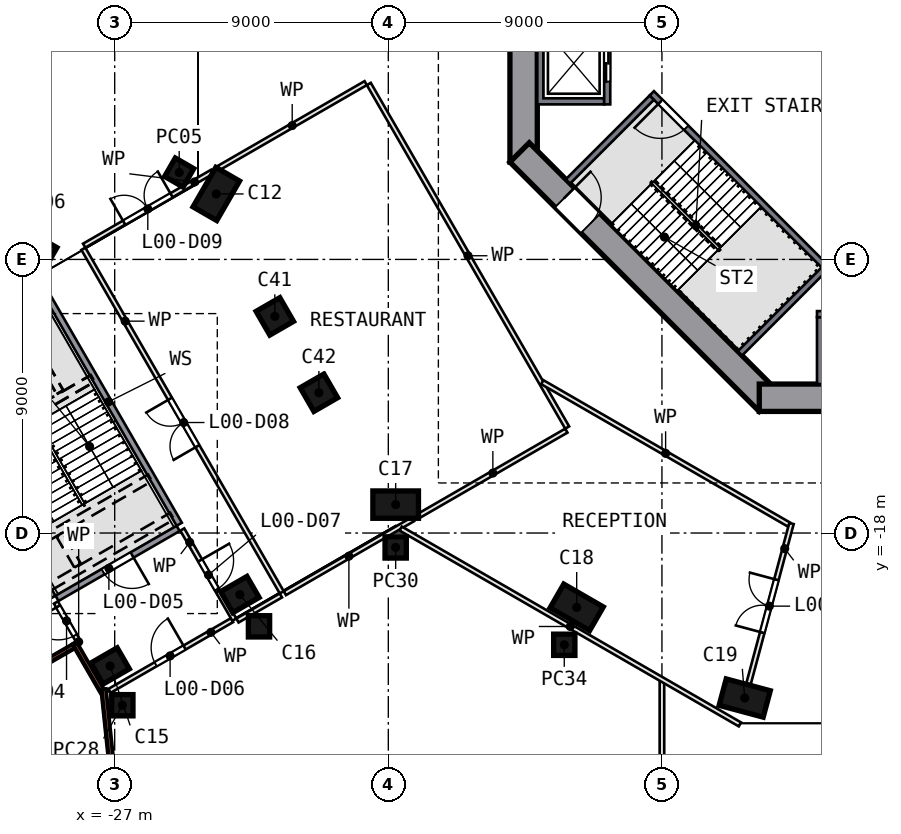
"""IFC4 building model, lengths in metres.
Left out: names, types, materials, properties, quantities, classifications, styles, units other than length and angle.
Written with IfcOpenShell. Run it as: python <this file> out.ifc"""

import sys

from ifc_helpers import new_model, si_unit, direction, frame, frame_2d, origin, origin_2d, place, context, subcontext, project, spatial, polyline, rectangle, outline, extrude, element, fill, save


model = new_model("IFC4")
c1 = context("Model", 3, precision=1e-05, world=origin(), true_north=direction((0.0, 1.0)))
c2 = subcontext(c1, "Body", "Model", "MODEL_VIEW")
j1 = project(units=[si_unit("LENGTHUNIT", "METRE"), si_unit("PLANEANGLEUNIT", "RADIAN")], contexts=[c1])
p1 = place(None, origin())
s1 = spatial("IfcSite", under=j1, at=p1, CompositionType="ELEMENT")
p2 = place(p1, origin())
s2 = spatial("IfcBuilding", under=s1, at=p2, CompositionType="ELEMENT")
p3 = place(p2, origin())
s3 = spatial("IfcBuildingStorey", under=s2, at=p3, CompositionType="ELEMENT", Elevation=0.0)
p4 = place(p3, frame((-23.658, -6.846, 0.0), z_axis=(0.0, 0.0, 1.0), x_axis=(0.5, 0.866025404, 0.0)))
e1 = element("IfcColumn", 1, at=p4, inside=s3, PredefinedType="COLUMN", context=c2, shape_type="SweptSolid", body=[
    extrude(rectangle(XDim=1.5, YDim=0.9, at=origin_2d()), origin(), (0.0, 0.0, 1.0), 7.55),
])
for number, where, z_axis, x_axis in (
    (2, (-27.151, -22.373, 0.0), (0.0, 0.0, 1.0), (0.866, 0.5, 0.0)),
    (3, (-22.883, -20.024, 0.0), (0.0, 0.0, 1.0), (0.866, 0.5, 0.0)),
):
    element("IfcColumn", number, at=place(p3, frame(where, z_axis=z_axis, x_axis=x_axis)), inside=s3, PredefinedType="COLUMN", context=c2, shape_type="SweptSolid", body=[
        extrude(rectangle(XDim=1.0, YDim=0.8, at=origin_2d()), origin(), (0.0, 0.0, 1.0), 7.55),
    ])
for number, where, z_axis, x_axis in (
    (4, (-17.758, -17.065, 0.0), (0.0, 0.0, 1.0), (-1.0, 0.0, 0.0)),
    (5, (-11.804, -20.445, 0.0), (0.0, 0.0, 1.0), (0.866, -0.5, 0.0)),
    (6, (-6.278, -23.428, 0.0), (0.0, 0.0, 1.0), (-0.966, 0.259, 0.0)),
):
    element("IfcColumn", number, at=place(p3, frame(where, z_axis=z_axis, x_axis=x_axis)), inside=s3, PredefinedType="COLUMN", context=c2, shape_type="SweptSolid", body=[
        extrude(rectangle(XDim=1.5, YDim=0.9, at=origin_2d()), origin(), (0.0, 0.0, 1.0), 7.55),
    ])
for number, where, z_axis, x_axis in (
    (7, (-21.733, -10.873, 0.0), (0.0, 0.0, 1.0), (-0.866, -0.5, 0.0)),
    (8, (-20.283, -13.385, 0.0), (0.0, 0.0, 1.0), (-0.866, -0.5, 0.0)),
):
    element("IfcColumn", number, at=place(p3, frame(where, z_axis=z_axis, x_axis=x_axis)), inside=s3, PredefinedType="COLUMN", context=c2, shape_type="SweptSolid", body=[
        extrude(rectangle(XDim=0.9, YDim=0.9, at=origin_2d()), origin(), (0.0, 0.0, 1.0), 7.55),
    ])
p5 = place(p3, frame((-13.55, 5.799, 0.0), z_axis=(0.0, 0.0, 1.0), x_axis=(0.0, -1.0, 0.0)))
e9 = element("IfcWall", 9, at=p5, inside=s3, PredefinedType="SHEAR", context=c2, shape_type="SweptSolid", body=[
    extrude(rectangle(XDim=11.598, YDim=0.9, at=frame_2d((5.799, 0.0))), origin(), (0.0, 0.0, 1.0), 8.0),
])
p6 = place(p5, frame((4.899, 0.0, 0.0)))
e10 = element("IfcOpeningElement", 10, at=p6, cuts=e9, PredefinedType="OPENING", context=c2, shape_type="SweptSolid", body=[
    extrude(rectangle(XDim=1.8, YDim=2.1, at=frame_2d((0.9, 1.05))), frame((0.0, 0.46, 0.0), z_axis=(0.0, -1.0, 0.0), x_axis=(1.0, 0.0, 0.0)), (0.0, 0.0, 1.0), 0.92),
])
p7 = place(p3, frame((-13.682, -5.481, 0.0), z_axis=(0.0, 0.0, 1.0), x_axis=(0.707106781, -0.707106781, 0.0)))
e11 = element("IfcWall", 11, at=p7, inside=s3, PredefinedType="SHEAR", context=c2, shape_type="SweptSolid", body=[
    extrude(rectangle(XDim=11.598, YDim=0.9, at=frame_2d((5.799, 0.0))), origin(), (0.0, 0.0, 1.0), 8.0),
])
p8 = place(p7, frame((2.099, 0.0, 0.0)))
e12 = element("IfcOpeningElement", 12, at=p8, cuts=e11, PredefinedType="OPENING", context=c2, shape_type="SweptSolid", body=[
    extrude(rectangle(XDim=1.2, YDim=2.1, at=frame_2d((0.6, 1.05))), frame((0.0, 0.46, 0.0), z_axis=(0.0, -1.0, 0.0), x_axis=(1.0, 0.0, 0.0)), (0.0, 0.0, 1.0), 0.92),
])
p9 = place(p3, frame((-5.799, -13.55, 0.0), z_axis=(0.0, 0.0, 1.0), x_axis=(1.0, 0.0, 0.0)))
e13 = element("IfcWall", 13, at=p9, inside=s3, PredefinedType="SHEAR", context=c2, shape_type="SweptSolid", body=[
    extrude(rectangle(XDim=11.598, YDim=0.9, at=frame_2d((5.799, 0.0))), origin(), (0.0, 0.0, 1.0), 8.0),
])
p10 = place(p9, frame((4.899, 0.0, 0.0)))
e14 = element("IfcOpeningElement", 14, at=p10, cuts=e13, PredefinedType="OPENING", context=c2, shape_type="SweptSolid", body=[
    extrude(rectangle(XDim=1.8, YDim=2.1, at=frame_2d((0.9, 1.05))), frame((0.0, 0.46, 0.0), z_axis=(0.0, -1.0, 0.0), x_axis=(1.0, 0.0, 0.0)), (0.0, 0.0, 1.0), 0.92),
])
for number, where, z_axis, x_axis in (
    (15, (-24.878, -6.142, 0.0), (0.0, 0.0, 1.0), (-0.866, 0.5, 0.0)),
    (16, (-29.378, -8.74, 0.0), (0.0, 0.0, 1.0), (-0.866, 0.5, 0.0)),
    (17, (-26.749, -23.665, 0.0), (0.0, 0.0, 1.0), (0.0, -1.0, 0.0)),
    (18, (-22.253, -21.07, 0.0), (0.0, 0.0, 1.0), (0.0, -1.0, 0.0)),
    (19, (-17.758, -18.474, 0.0), (0.0, 0.0, 1.0), (0.0, -1.0, 0.0)),
    (20, (-12.212, -21.676, 0.0), (0.0, 0.0, 1.0), (0.0, -1.0, 0.0)),
):
    element("IfcColumn", number, at=place(p3, frame(where, z_axis=z_axis, x_axis=x_axis)), inside=s3, PredefinedType="COLUMN", context=c2, shape_type="SweptSolid", body=[
        extrude(rectangle(XDim=0.7, YDim=0.7, at=origin_2d()), origin(), (0.0, 0.0, 1.0), 8.0),
    ])
p11 = place(p3, frame((-29.78, -22.54, 0.0), z_axis=(0.0, 0.0, 1.0), x_axis=(0.865989634, 0.500061949, 0.0)))
e21 = element("IfcWall", 21, at=p11, inside=s3, PredefinedType="SOLIDWALL", context=c2, shape_type="SweptSolid", body=[
    extrude(rectangle(XDim=1.66, YDim=0.14, at=frame_2d((0.83, 0.0))), origin(), (0.0, 0.0, 1.0), 7.55),
])
p12 = place(p3, frame((-28.317, -21.614, 0.0), z_axis=(0.0, 0.0, 1.0), x_axis=(0.499983248, -0.866035075, 0.0)))
e22 = element("IfcWall", 22, at=p12, inside=s3, PredefinedType="SOLIDWALL", context=c2, shape_type="SweptSolid", body=[
    extrude(rectangle(XDim=1.783, YDim=0.14, at=frame_2d((0.891, 0.0))), origin(), (0.0, 0.0, 1.0), 7.55),
])
p13 = place(p3, frame((-25.925, -36.773, 0.0), z_axis=(0.0, 0.0, 1.0), x_axis=(-0.104443805, 0.99453079, 0.0)))
e23 = element("IfcWall", 23, at=p13, inside=s3, PredefinedType="SOLIDWALL", context=c2, shape_type="SweptSolid", body=[
    extrude(rectangle(XDim=13.712, YDim=0.14, at=frame_2d((6.856, 0.0))), origin(), (0.0, 0.0, 1.0), 7.55),
])
p14 = place(p13, frame((9.383, 0.0, 0.0)))
e24 = element("IfcOpeningElement", 24, at=p14, cuts=e23, PredefinedType="OPENING", context=c2, shape_type="SweptSolid", body=[
    extrude(rectangle(XDim=1.1, YDim=2.4, at=frame_2d((0.55, 1.2))), frame((0.0, 0.08, 0.0), z_axis=(0.0, -1.0, 0.0), x_axis=(1.0, 0.0, 0.0)), (0.0, 0.0, 1.0), 0.16),
])
p15 = place(p13, frame((3.004, 0.0, 0.0)))
e25 = element("IfcOpeningElement", 25, at=p15, cuts=e23, PredefinedType="OPENING", context=c2, shape_type="SweptSolid", body=[
    extrude(rectangle(XDim=1.1, YDim=2.4, at=frame_2d((0.55, 1.2))), frame((0.0, 0.08, 0.0), z_axis=(0.0, -1.0, 0.0), x_axis=(1.0, 0.0, 0.0)), (0.0, 0.0, 1.0), 0.16),
])
p16 = place(p3, origin())
e26 = element("IfcWall", 26, at=p16, inside=s3, PredefinedType="SOLIDWALL", context=c2, shape_type="SweptSolid", body=[
    extrude(outline(polyline([(-13.1, -3.9), (-13.1, -1.2), (-10.9, -1.2), (-10.9, -1.4), (-12.9, -1.4), (-12.9, -3.7), (-10.9, -3.7), (-10.9, -3.9), (-13.1, -3.9)])), origin(), (0.0, 0.0, 1.0), 7.55),
])
p17 = place(p3, frame((-10.8, -1.2, 0.0), z_axis=(0.0, 0.0, 1.0), x_axis=(0.0, -1.0, 0.0)))
e27 = element("IfcWall", 27, at=p17, inside=s3, PredefinedType="SOLIDWALL", context=c2, shape_type="SweptSolid", body=[
    extrude(rectangle(XDim=2.7, YDim=0.2, at=frame_2d((1.35, 0.0))), origin(), (0.0, 0.0, 1.0), 7.55),
])
p18 = place(p17, frame((0.75, 0.0, 0.0)))
e28 = element("IfcOpeningElement", 28, at=p18, cuts=e27, PredefinedType="OPENING", context=c2, shape_type="SweptSolid", body=[
    extrude(rectangle(XDim=1.2, YDim=2.1, at=frame_2d((0.6, 1.05))), frame((0.0, 0.11, 0.0), z_axis=(0.0, -1.0, 0.0), x_axis=(1.0, 0.0, 0.0)), (0.0, 0.0, 1.0), 0.22),
])
p19 = place(p3, origin())
e29 = element("IfcWall", 29, at=p19, inside=s3, PredefinedType="SOLIDWALL", context=c2, shape_type="SweptSolid", body=[
    extrude(outline(polyline([(-3.9, -13.1), (-3.9, -10.9), (-3.7, -10.9), (-3.7, -12.9), (-1.4, -12.9), (-1.4, -10.9), (-1.2, -10.9), (-1.2, -13.1), (-3.9, -13.1)])), origin(), (0.0, 0.0, 1.0), 7.55),
])
p20 = place(p3, frame((-1.2, -10.8, 0.0), z_axis=(0.0, 0.0, 1.0), x_axis=(-1.0, 0.0, 0.0)))
e30 = element("IfcWall", 30, at=p20, inside=s3, PredefinedType="SOLIDWALL", context=c2, shape_type="SweptSolid", body=[
    extrude(rectangle(XDim=2.7, YDim=0.2, at=frame_2d((1.35, 0.0))), origin(), (0.0, 0.0, 1.0), 7.55),
])
p21 = place(p20, frame((0.75, 0.0, 0.0)))
e31 = element("IfcOpeningElement", 31, at=p21, cuts=e30, PredefinedType="OPENING", context=c2, shape_type="SweptSolid", body=[
    extrude(rectangle(XDim=1.2, YDim=2.1, at=frame_2d((0.6, 1.05))), frame((0.0, 0.11, 0.0), z_axis=(0.0, -1.0, 0.0), x_axis=(1.0, 0.0, 0.0)), (0.0, 0.0, 1.0), 0.22),
])
p22 = place(p3, frame((-3.535, -9.334, 0.0), z_axis=(0.0, 0.0, 1.0), x_axis=(-0.707106781, 0.707106781, 0.0)))
e32 = element("IfcWall", 32, at=p22, inside=s3, PredefinedType="SOLIDWALL", context=c2, shape_type="SweptSolid", body=[
    extrude(rectangle(XDim=8.2, YDim=0.2, at=frame_2d((4.1, 0.0))), origin(), (0.0, 0.0, 1.0), 7.55),
])
p23 = place(p22, frame((6.6, 0.0, 0.0)))
e33 = element("IfcOpeningElement", 33, at=p23, cuts=e32, PredefinedType="OPENING", context=c2, shape_type="SweptSolid", body=[
    extrude(rectangle(XDim=1.2, YDim=2.1, at=frame_2d((0.6, 1.05))), frame((0.0, 0.11, 0.0), z_axis=(0.0, -1.0, 0.0), x_axis=(1.0, 0.0, 0.0)), (0.0, 0.0, 1.0), 0.22),
])
for number, where, z_axis, x_axis in (
    (34, (-9.334, -3.677, 0.0), (0.0, 0.0, 1.0), (-0.707, -0.707, 0.0)),
    (35, (-3.677, -9.334, 0.0), (0.0, 0.0, 1.0), (-0.707, -0.707, 0.0)),
):
    element("IfcWall", number, at=place(p3, frame(where, z_axis=z_axis, x_axis=x_axis)), inside=s3, PredefinedType="SOLIDWALL", context=c2, shape_type="SweptSolid", body=[
        extrude(rectangle(XDim=3.9, YDim=0.2, at=frame_2d((1.95, 0.0))), origin(), (0.0, 0.0, 1.0), 7.55),
    ])
p24 = place(p3, frame((-32.807, -13.577, 0.0), z_axis=(0.0, 0.0, 1.0), x_axis=(0.50000534, -0.866022321, 0.0)))
e36 = element("IfcWall", 36, at=p24, inside=s3, PredefinedType="SOLIDWALL", context=c2, shape_type="SweptSolid", body=[
    extrude(rectangle(XDim=7.545, YDim=0.2, at=frame_2d((3.773, 0.0))), origin(), (0.0, 0.0, 1.0), 7.55),
])
p25 = place(p3, frame((-28.162, -21.623, 0.0), z_axis=(0.0, 0.0, 1.0), x_axis=(-0.499877454, 0.866096144, 0.0)))
e37 = element("IfcWall", 37, at=p25, inside=s3, PredefinedType="PARTITIONING", context=c2, shape_type="SweptSolid", body=[
    extrude(rectangle(XDim=1.545, YDim=0.15, at=frame_2d((0.773, 0.0))), origin(), (0.0, 0.0, 1.0), 7.55),
])
p26 = place(p25, frame((0.295, 0.0, 0.0)))
e38 = element("IfcOpeningElement", 38, at=p26, cuts=e37, PredefinedType="OPENING", context=c2, shape_type="SweptSolid", body=[
    extrude(rectangle(XDim=1.1, YDim=2.1, at=frame_2d((0.55, 1.05))), frame((0.0, 0.085, 0.0), z_axis=(0.0, -1.0, 0.0), x_axis=(1.0, 0.0, 0.0)), (0.0, 0.0, 1.0), 0.17),
])
p27 = place(p3, frame((-24.914, -17.848, 0.0), z_axis=(0.0, 0.0, 1.0), x_axis=(-0.86601677, -0.500014953, 0.0)))
e39 = element("IfcWall", 39, at=p27, inside=s3, PredefinedType="SOLIDWALL", context=c2, shape_type="SweptSolid", body=[
    extrude(rectangle(XDim=4.6, YDim=0.2, at=frame_2d((2.3, 0.0))), origin(), (0.0, 0.0, 1.0), 7.55),
])
p28 = place(p27, frame((1.75, 0.0, 0.0)))
e40 = element("IfcOpeningElement", 40, at=p28, cuts=e39, PredefinedType="OPENING", context=c2, shape_type="SweptSolid", body=[
    extrude(rectangle(XDim=1.1, YDim=2.1, at=frame_2d((0.55, 1.05))), frame((0.0, 0.11, 0.0), z_axis=(0.0, -1.0, 0.0), x_axis=(1.0, 0.0, 0.0)), (0.0, 0.0, 1.0), 0.22),
])
p29 = place(p3, frame((-27.169, -23.192, 0.0), z_axis=(0.0, 0.0, 1.0), x_axis=(0.866011597, 0.500023913, 0.0)))
e41 = element("IfcWall", 41, at=p29, inside=s3, PredefinedType="PARTITIONING", context=c2, shape_type="SweptSolid", body=[
    extrude(rectangle(XDim=4.65, YDim=0.15, at=frame_2d((2.325, 0.0))), origin(), (0.0, 0.0, 1.0), 7.55),
])
p30 = place(p29, frame((1.75, 0.0, 0.0)))
e42 = element("IfcOpeningElement", 42, at=p30, cuts=e41, PredefinedType="OPENING", context=c2, shape_type="SweptSolid", body=[
    extrude(rectangle(XDim=1.1, YDim=2.1, at=frame_2d((0.55, 1.05))), frame((0.0, 0.085, 0.0), z_axis=(0.0, -1.0, 0.0), x_axis=(1.0, 0.0, 0.0)), (0.0, 0.0, 1.0), 0.17),
])
p31 = place(p3, frame((-24.877, -17.712, 0.0), z_axis=(0.0, 0.0, 1.0), x_axis=(-0.499984537, 0.866034331, 0.0)))
e43 = element("IfcWall", 43, at=p31, inside=s3, PredefinedType="SOLIDWALL", context=c2, shape_type="SweptSolid", body=[
    extrude(rectangle(XDim=9.3, YDim=0.2, at=frame_2d((4.65, 0.0))), origin(), (0.0, 0.0, 1.0), 7.55),
])
p32 = place(p3, frame((-24.777, -17.885, 0.0), z_axis=(0.0, 0.0, 1.0), x_axis=(0.500041249, -0.866001587, 0.0)))
e44 = element("IfcWall", 44, at=p32, inside=s3, PredefinedType="PARTITIONING", context=c2, shape_type="SweptSolid", body=[
    extrude(rectangle(XDim=3.425, YDim=0.15, at=frame_2d((1.712, 0.0))), origin(), (0.0, 0.0, 1.0), 7.55),
])
p33 = place(p32, frame((1.175, 0.0, 0.0)))
e45 = element("IfcOpeningElement", 45, at=p33, cuts=e44, PredefinedType="OPENING", context=c2, shape_type="SweptSolid", body=[
    extrude(rectangle(XDim=1.1, YDim=2.1, at=frame_2d((0.55, 1.05))), frame((0.0, 0.085, 0.0), z_axis=(0.0, -1.0, 0.0), x_axis=(1.0, 0.0, 0.0)), (0.0, 0.0, 1.0), 0.17),
])
p34 = place(p3, frame((-22.962, -20.878, 0.0), z_axis=(0.0, 0.0, 1.0), x_axis=(0.866040212, 0.499974351, 0.0)))
e46 = element("IfcWall", 46, at=p34, inside=s3, PredefinedType="PARTITIONING", context=c2, shape_type="SweptSolid", body=[
    extrude(rectangle(XDim=1.65, YDim=0.15, at=frame_2d((0.825, 0.0))), origin(), (0.0, 0.0, 1.0), 7.55),
])
p35 = place(p3, frame((-21.506, -19.951, 0.0), z_axis=(0.0, 0.0, 1.0), x_axis=(-0.499998298, 0.866026387, 0.0)))
e47 = element("IfcWall", 47, at=p35, inside=s3, PredefinedType="PARTITIONING", context=c2, shape_type="SweptSolid", body=[
    extrude(rectangle(XDim=13.05, YDim=0.15, at=frame_2d((6.525, 0.0))), origin(), (0.0, 0.0, 1.0), 7.55),
])
p36 = place(p35, frame((5.55, 0.0, 0.0)))
e48 = element("IfcOpeningElement", 48, at=p36, cuts=e47, PredefinedType="OPENING", context=c2, shape_type="SweptSolid", body=[
    extrude(rectangle(XDim=1.8, YDim=2.1, at=frame_2d((0.9, 1.05))), frame((0.0, 0.085, 0.0), z_axis=(0.0, -1.0, 0.0), x_axis=(1.0, 0.0, 0.0)), (0.0, 0.0, 1.0), 0.17),
])
p37 = place(p3, frame((-21.404, -19.979, 0.0), z_axis=(0.0, 0.0, 1.0), x_axis=(0.866005103, 0.50003516, 0.0)))
e49 = element("IfcWall", 49, at=p37, inside=s3, PredefinedType="PARTITIONING", context=c2, shape_type="SweptSolid", body=[
    extrude(rectangle(XDim=4.866, YDim=0.15, at=frame_2d((2.433, 0.0))), origin(), (0.0, 0.0, 1.0), 7.55),
])
p38 = place(p3, frame((-16.978, -17.424, 0.0), z_axis=(0.0, 0.0, 1.0), x_axis=(0.866016603, 0.500015243, 0.0)))
e50 = element("IfcWall", 50, at=p38, inside=s3, PredefinedType="PARTITIONING", context=c2, shape_type="SweptSolid", body=[
    extrude(rectangle(XDim=5.582, YDim=0.15, at=frame_2d((2.791, 0.0))), origin(), (0.0, 0.0, 1.0), 7.55),
])
p39 = place(p3, frame((-28.003, -8.547, 0.0), z_axis=(0.0, 0.0, 1.0), x_axis=(0.866014286, 0.500019257, 0.0)))
e51 = element("IfcWall", 51, at=p39, inside=s3, PredefinedType="PARTITIONING", context=c2, shape_type="SweptSolid", body=[
    extrude(rectangle(XDim=4.865, YDim=0.15, at=frame_2d((2.433, 0.0))), origin(), (0.0, 0.0, 1.0), 7.55),
])
p40 = place(p39, frame((1.516, 0.0, 0.0)))
e52 = element("IfcOpeningElement", 52, at=p40, cuts=e51, PredefinedType="OPENING", context=c2, shape_type="SweptSolid", body=[
    extrude(rectangle(XDim=1.8, YDim=2.1, at=frame_2d((0.9, 1.05))), frame((0.0, 0.085, 0.0), z_axis=(0.0, -1.0, 0.0), x_axis=(1.0, 0.0, 0.0)), (0.0, 0.0, 1.0), 0.17),
])
p41 = place(p3, frame((-18.744, -3.201, 0.0), z_axis=(0.0, 0.0, 1.0), x_axis=(-0.866027538, -0.499996304, 0.0)))
e53 = element("IfcWall", 53, at=p41, inside=s3, PredefinedType="PARTITIONING", context=c2, shape_type="SweptSolid", body=[
    extrude(rectangle(XDim=5.582, YDim=0.15, at=frame_2d((2.791, 0.0))), origin(), (0.0, 0.0, 1.0), 7.55),
])
p42 = place(p3, frame((-12.117, -14.53, 0.0), z_axis=(0.0, 0.0, 1.0), x_axis=(-0.500006399, 0.866021709, 0.0)))
e54 = element("IfcWall", 54, at=p42, inside=s3, PredefinedType="PARTITIONING", context=c2, shape_type="SweptSolid", body=[
    extrude(rectangle(XDim=13.05, YDim=0.15, at=frame_2d((6.525, 0.0))), origin(), (0.0, 0.0, 1.0), 7.55),
])
p43 = place(p3, frame((-9.0, -22.89, 0.0), z_axis=(0.0, 0.0, 1.0), x_axis=(0.0, -1.0, 0.0)))
e55 = element("IfcWall", 55, at=p43, inside=s3, PredefinedType="PARTITIONING", context=c2, shape_type="SweptSolid", body=[
    extrude(rectangle(XDim=20.965, YDim=0.15, at=frame_2d((10.482, 0.0))), origin(), (0.0, 0.0, 1.0), 7.55),
])
p44 = place(p43, frame((9.615, 0.0, 0.0)))
e56 = element("IfcOpeningElement", 56, at=p44, cuts=e55, PredefinedType="OPENING", context=c2, shape_type="SweptSolid", body=[
    extrude(rectangle(XDim=1.8, YDim=2.1, at=frame_2d((0.9, 1.05))), frame((0.0, 0.085, 0.0), z_axis=(0.0, -1.0, 0.0), x_axis=(1.0, 0.0, 0.0)), (0.0, 0.0, 1.0), 0.17),
])
p45 = place(p3, frame((-6.435, -24.296, 0.0), z_axis=(0.0, 0.0, 1.0), x_axis=(-0.866023714, 0.500002927, 0.0)))
e57 = element("IfcWall", 57, at=p45, inside=s3, PredefinedType="PARTITIONING", context=c2, shape_type="SweptSolid", body=[
    extrude(rectangle(XDim=12.885, YDim=0.15, at=frame_2d((6.442, 0.0))), origin(), (0.0, 0.0, 1.0), 7.55),
])
p46 = place(p3, frame((-6.153, -22.965, 0.0), z_axis=(0.0, 0.0, 1.0), x_axis=(0.258794143, 0.965932498, 0.0)))
e58 = element("IfcWall", 58, at=p46, inside=s3, PredefinedType="PARTITIONING", context=c2, shape_type="SweptSolid", body=[
    extrude(rectangle(XDim=5.465, YDim=0.15, at=frame_2d((2.732, 0.0))), origin(), (0.0, 0.0, 1.0), 7.55),
])
p47 = place(p46, frame((1.75, 0.0, 0.0)))
e59 = element("IfcOpeningElement", 59, at=p47, cuts=e58, PredefinedType="OPENING", context=c2, shape_type="SweptSolid", body=[
    extrude(rectangle(XDim=1.8, YDim=2.1, at=frame_2d((0.9, 1.05))), frame((0.0, 0.085, 0.0), z_axis=(0.0, -1.0, 0.0), x_axis=(1.0, 0.0, 0.0)), (0.0, 0.0, 1.0), 0.17),
])
p48 = place(p3, frame((-4.823, -17.721, 0.0), z_axis=(0.0, 0.0, 1.0), x_axis=(-0.866037142, 0.499979668, 0.0)))
e60 = element("IfcWall", 60, at=p48, inside=s3, PredefinedType="PARTITIONING", context=c2, shape_type="SweptSolid", body=[
    extrude(rectangle(XDim=9.367, YDim=0.15, at=frame_2d((4.683, 0.0))), origin(), (0.0, 0.0, 1.0), 7.55),
])
p49 = place(p18, origin())
e61 = element("IfcDoor", 61, at=p49, inside=s3, OperationType="DOUBLE_DOOR_SLIDING", PredefinedType="DOOR", context=c2, shape_type="SweptSolid", body=[
    extrude(rectangle(XDim=1.2, YDim=2.1, at=frame_2d((0.6, 1.05))), frame((0.0, 0.025, 0.0), z_axis=(0.0, -1.0, 0.0), x_axis=(1.0, 0.0, 0.0)), (0.0, 0.0, 1.0), 0.05),
])
fill(e28, e61)
p50 = place(p23, origin())
e62 = element("IfcDoor", 62, at=p50, inside=s3, OperationType="SINGLE_SWING_RIGHT", PredefinedType="DOOR", context=c2, shape_type="SweptSolid", body=[
    extrude(rectangle(XDim=1.2, YDim=2.1, at=frame_2d((0.6, 1.05))), frame((0.0, 0.025, 0.0), z_axis=(0.0, -1.0, 0.0), x_axis=(1.0, 0.0, 0.0)), (0.0, 0.0, 1.0), 0.05),
])
fill(e33, e62)
p51 = place(p8, origin())
e63 = element("IfcDoor", 63, at=p51, inside=s3, OperationType="SINGLE_SWING_LEFT", PredefinedType="DOOR", context=c2, shape_type="SweptSolid", body=[
    extrude(rectangle(XDim=1.2, YDim=2.1, at=frame_2d((0.6, 1.05))), frame((0.0, 0.025, 0.0), z_axis=(0.0, -1.0, 0.0), x_axis=(1.0, 0.0, 0.0)), (0.0, 0.0, 1.0), 0.05),
])
fill(e12, e63)
p52 = place(p26, origin())
e64 = element("IfcDoor", 64, at=p52, inside=s3, OperationType="SINGLE_SWING_RIGHT", PredefinedType="DOOR", context=c2, shape_type="SweptSolid", body=[
    extrude(rectangle(XDim=1.1, YDim=2.1, at=frame_2d((0.55, 1.05))), frame((0.0, 0.025, 0.0), z_axis=(0.0, -1.0, 0.0), x_axis=(1.0, 0.0, 0.0)), (0.0, 0.0, 1.0), 0.05),
])
fill(e38, e64)
p53 = place(p28, origin())
e65 = element("IfcDoor", 65, at=p53, inside=s3, OperationType="SINGLE_SWING_LEFT", PredefinedType="DOOR", context=c2, shape_type="SweptSolid", body=[
    extrude(rectangle(XDim=1.1, YDim=2.1, at=frame_2d((0.55, 1.05))), frame((0.0, 0.025, 0.0), z_axis=(0.0, -1.0, 0.0), x_axis=(1.0, 0.0, 0.0)), (0.0, 0.0, 1.0), 0.05),
])
fill(e40, e65)
p54 = place(p30, origin())
e66 = element("IfcDoor", 66, at=p54, inside=s3, OperationType="SINGLE_SWING_RIGHT", PredefinedType="DOOR", context=c2, shape_type="SweptSolid", body=[
    extrude(rectangle(XDim=1.1, YDim=2.1, at=frame_2d((0.55, 1.05))), frame((0.0, 0.025, 0.0), z_axis=(0.0, -1.0, 0.0), x_axis=(1.0, 0.0, 0.0)), (0.0, 0.0, 1.0), 0.05),
])
fill(e42, e66)
p55 = place(p33, origin())
e67 = element("IfcDoor", 67, at=p55, inside=s3, OperationType="SINGLE_SWING_LEFT", PredefinedType="DOOR", context=c2, shape_type="SweptSolid", body=[
    extrude(rectangle(XDim=1.1, YDim=2.1, at=frame_2d((0.55, 1.05))), frame((0.0, 0.025, 0.0), z_axis=(0.0, -1.0, 0.0), x_axis=(1.0, 0.0, 0.0)), (0.0, 0.0, 1.0), 0.05),
])
fill(e45, e67)
p56 = place(p36, origin())
e68 = element("IfcDoor", 68, at=p56, inside=s3, OperationType="DOUBLE_DOOR_SINGLE_SWING", PredefinedType="DOOR", context=c2, shape_type="SweptSolid", body=[
    extrude(rectangle(XDim=1.8, YDim=2.1, at=frame_2d((0.9, 1.05))), frame((0.0, 0.025, 0.0), z_axis=(0.0, -1.0, 0.0), x_axis=(1.0, 0.0, 0.0)), (0.0, 0.0, 1.0), 0.05),
])
fill(e48, e68)
p57 = place(p40, origin())
e69 = element("IfcDoor", 69, at=p57, inside=s3, OperationType="DOUBLE_DOOR_SINGLE_SWING", PredefinedType="DOOR", context=c2, shape_type="SweptSolid", body=[
    extrude(rectangle(XDim=1.8, YDim=2.1, at=frame_2d((0.9, 1.05))), frame((0.0, 0.025, 0.0), z_axis=(0.0, -1.0, 0.0), x_axis=(1.0, 0.0, 0.0)), (0.0, 0.0, 1.0), 0.05),
])
fill(e52, e69)
p58 = place(p47, origin())
e70 = element("IfcDoor", 70, at=p58, inside=s3, OperationType="DOUBLE_DOOR_SINGLE_SWING", PredefinedType="DOOR", context=c2, shape_type="SweptSolid", body=[
    extrude(rectangle(XDim=1.8, YDim=2.1, at=frame_2d((0.9, 1.05))), frame((0.0, 0.025, 0.0), z_axis=(0.0, -1.0, 0.0), x_axis=(1.0, 0.0, 0.0)), (0.0, 0.0, 1.0), 0.05),
])
fill(e59, e70)
save(model, sys.argv[1])
